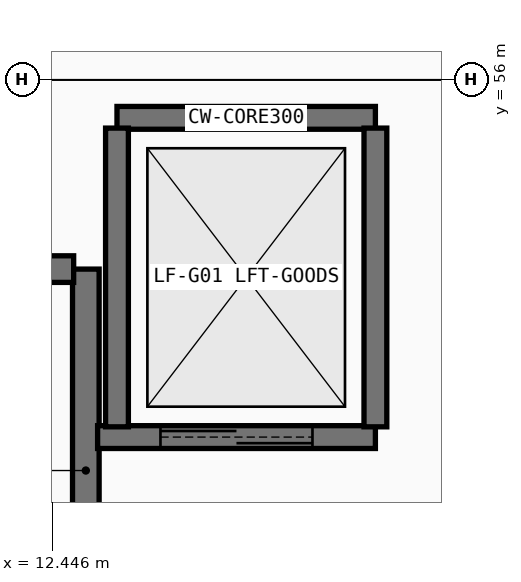
"""IFC4 building model, lengths in metres.
Left out: names, types, materials, properties, quantities, classifications, styles, units other than length and angle.
Written with IfcOpenShell. Run it as: python <this file> out.ifc"""

import sys

from ifc_helpers import new_model, si_unit, direction, frame, frame_2d, origin, place, context, subcontext, project, spatial, rectangle, extrude, element, fill, save


model = new_model("IFC4")
c1 = context("Model", 3, precision=1e-05, world=origin(), true_north=direction((0.0, 1.0)))
c2 = subcontext(c1, "Body", "Model", "MODEL_VIEW")
j1 = project(units=[si_unit("LENGTHUNIT", "METRE"), si_unit("PLANEANGLEUNIT", "RADIAN")], contexts=[c1])
p1 = place(None, origin())
s1 = spatial("IfcSite", under=j1, at=p1, CompositionType="ELEMENT")
p2 = place(p1, origin())
s2 = spatial("IfcBuilding", under=s1, at=p2, CompositionType="ELEMENT")
p3 = place(p2, frame((0.0, 0.0, -5.4)))
s3 = spatial("IfcBuildingStorey", under=s2, at=p3, CompositionType="ELEMENT", Elevation=-5.4)
p4 = place(p3, frame((12.89, 48.21, 0.0), z_axis=(0.0, 0.0, 1.0), x_axis=(0.0, 1.0, 0.0)))
e1 = element("IfcWall", 1, at=p4, inside=s3, PredefinedType="SHEAR", context=c2, shape_type="SweptSolid", body=[
    extrude(rectangle(XDim=5.3, YDim=0.35, at=frame_2d((2.65, 0.0))), origin(), (0.0, 0.0, 1.0), 5.09),
])
p5 = place(p3, frame((12.73, 53.51, 0.0), z_axis=(0.0, 0.0, 1.0), x_axis=(-1.0, 0.0, 0.0)))
e2 = element("IfcWall", 2, at=p5, inside=s3, PredefinedType="SHEAR", context=c2, shape_type="SweptSolid", body=[
    extrude(rectangle(XDim=10.88, YDim=0.35, at=frame_2d((5.44, 0.0))), origin(), (0.0, 0.0, 1.0), 5.09),
])
p6 = place(p3, frame((16.7, 55.5, 0.0), z_axis=(0.0, 0.0, 1.0), x_axis=(-1.0, 0.0, 0.0)))
e3 = element("IfcWall", 3, at=p6, inside=s3, PredefinedType="SHEAR", context=c2, shape_type="SweptSolid", body=[
    extrude(rectangle(XDim=3.4, YDim=0.3, at=frame_2d((1.7, 0.0))), origin(), (0.0, 0.0, 1.0), 5.09),
])
p7 = place(p3, frame((13.045, 51.3, 0.0), z_axis=(0.0, 0.0, 1.0), x_axis=(1.0, 0.0, 0.0)))
e4 = element("IfcWall", 4, at=p7, inside=s3, PredefinedType="SHEAR", context=c2, shape_type="SweptSolid", body=[
    extrude(rectangle(XDim=3.655, YDim=0.3, at=frame_2d((1.828, 0.0))), origin(), (0.0, 0.0, 1.0), 5.09),
])
p8 = place(p7, frame((0.827, 0.0, 0.0)))
e5 = element("IfcOpeningElement", 5, at=p8, cuts=e4, PredefinedType="OPENING", context=c2, shape_type="SweptSolid", body=[
    extrude(rectangle(XDim=2.0, YDim=2.5, at=frame_2d((1.0, 1.25))), frame((0.0, 0.16, 0.0), z_axis=(0.0, -1.0, 0.0), x_axis=(1.0, 0.0, 0.0)), (0.0, 0.0, 1.0), 0.32),
])
for number, where, z_axis, x_axis in (
    (6, (16.7, 51.435, 0.0), (0.0, 0.0, 1.0), (0.0, 1.0, 0.0)),
    (7, (13.3, 55.365, 0.0), (0.0, 0.0, 1.0), (0.0, -1.0, 0.0)),
):
    element("IfcWall", number, at=place(p3, frame(where, z_axis=z_axis, x_axis=x_axis)), inside=s3, PredefinedType="SHEAR", context=c2, shape_type="SweptSolid", body=[
        extrude(rectangle(XDim=3.93, YDim=0.3, at=frame_2d((1.965, 0.0))), origin(), (0.0, 0.0, 1.0), 5.09),
    ])
p9 = place(p8, origin())
e8 = element("IfcDoor", 8, at=p9, inside=s3, OperationType="DOUBLE_DOOR_SLIDING", PredefinedType="DOOR", context=c2, shape_type="SweptSolid", body=[
    extrude(rectangle(XDim=2.0, YDim=2.5, at=frame_2d((1.0, 1.25))), frame((0.0, 0.025, 0.0), z_axis=(0.0, -1.0, 0.0), x_axis=(1.0, 0.0, 0.0)), (0.0, 0.0, 1.0), 0.05),
])
fill(e5, e8)
save(model, sys.argv[1])
